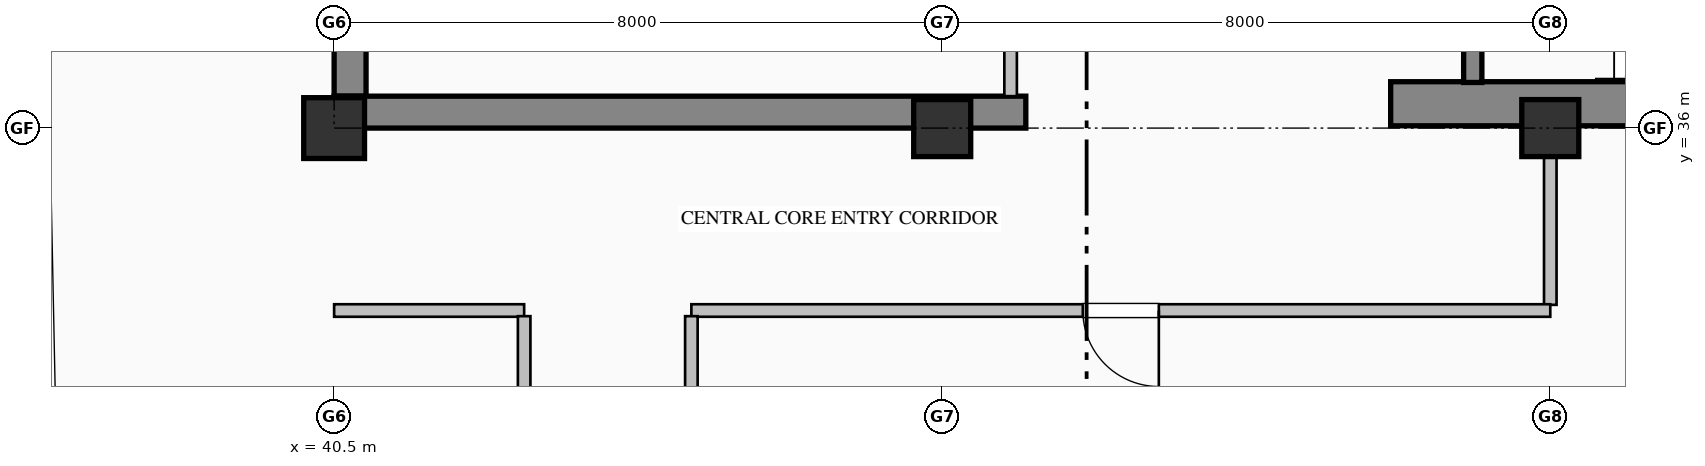
"""IFC4 building model, lengths in metres.
Left out: names, types, materials, properties, quantities, classifications, styles, units other than length and angle.
Written with IfcOpenShell. Run it as: python <this file> out.ifc"""

import sys

from ifc_helpers import new_model, si_unit, direction, frame, frame_2d, origin, origin_2d, place, context, subcontext, project, spatial, rectangle, hollow_rectangle, extrude, element, fill, save


model = new_model("IFC4")
c1 = context("Model", 3, precision=1e-05, world=origin(), true_north=direction((0.0, 1.0)))
c2 = subcontext(c1, "Body", "Model", "MODEL_VIEW")
j1 = project(units=[si_unit("LENGTHUNIT", "METRE"), si_unit("PLANEANGLEUNIT", "RADIAN")], contexts=[c1])
p1 = place(None, origin())
s1 = spatial("IfcSite", under=j1, at=p1, CompositionType="ELEMENT")
p2 = place(p1, origin())
s2 = spatial("IfcBuilding", under=s1, at=p2, CompositionType="ELEMENT")
p3 = place(p2, frame((0.0, 0.0, 291.2)))
s3 = spatial("IfcBuildingStorey", under=s2, at=p3, CompositionType="ELEMENT", Elevation=291.2)
p4 = place(p3, frame((40.71, 36.42, 0.0), z_axis=(0.0, 0.0, 1.0), x_axis=(0.0, 1.0, 0.0)))
e1 = element("IfcWall", 1, at=p4, inside=s3, PredefinedType="SHEAR", context=c2, shape_type="SweptSolid", body=[
    extrude(rectangle(XDim=7.98, YDim=0.42, at=frame_2d((3.99, 0.0))), origin(), (0.0, 0.0, 1.0), 3.785),
])
p5 = place(p3, frame((40.5, 36.21, 0.0), z_axis=(0.0, 0.0, 1.0), x_axis=(1.0, 0.0, 0.0)))
e2 = element("IfcWall", 2, at=p5, inside=s3, PredefinedType="SHEAR", context=c2, shape_type="SweptSolid", body=[
    extrude(rectangle(XDim=9.1, YDim=0.42, at=frame_2d((4.55, 0.0))), origin(), (0.0, 0.0, 1.0), 3.785),
])
p6 = place(p3, frame((54.4, 36.32, 0.0), z_axis=(0.0, 0.0, 1.0), x_axis=(1.0, 0.0, 0.0)))
e3 = element("IfcWall", 3, at=p6, inside=s3, PredefinedType="SHEAR", context=c2, shape_type="SweptSolid", body=[
    extrude(rectangle(XDim=9.6, YDim=0.58, at=frame_2d((4.8, 0.0))), origin(), (0.0, 0.0, 1.0), 4.0),
])
p7 = place(p3, frame((40.5, 36.0, 0.0), z_axis=(0.0, 0.0, 1.0), x_axis=(1.0, 0.0, 0.0)))
e4 = element("IfcColumn", 4, at=p7, inside=s3, PredefinedType="COLUMN", context=c2, shape_type="SweptSolid", body=[
    extrude(hollow_rectangle(XDim=0.8, YDim=0.8, WallThickness=0.032, at=origin_2d()), origin(), (0.0, 0.0, 1.0), 4.0),
])
for number, where, z_axis, x_axis in (
    (5, (48.5, 36.0, 0.0), (0.0, 0.0, 1.0), (1.0, 0.0, 0.0)),
    (6, (56.5, 36.0, 0.0), (0.0, 0.0, 1.0), (1.0, 0.0, 0.0)),
):
    element("IfcColumn", number, at=place(p3, frame(where, z_axis=z_axis, x_axis=x_axis)), inside=s3, PredefinedType="COLUMN", context=c2, shape_type="SweptSolid", body=[
        extrude(rectangle(XDim=0.75, YDim=0.75, at=origin_2d()), origin(), (0.0, 0.0, 1.0), 4.0),
    ])
p8 = place(p3, frame((55.48, 39.75, 0.0), z_axis=(0.0, 0.0, 1.0), x_axis=(0.0, -1.0, 0.0)))
e7 = element("IfcWall", 7, at=p8, inside=s3, PredefinedType="SOLIDWALL", context=c2, shape_type="SweptSolid", body=[
    extrude(rectangle(XDim=3.15, YDim=0.24, at=frame_2d((1.575, 0.0))), origin(), (0.0, 0.0, 1.0), 4.0),
])
p9 = place(p8, frame((1.0, 0.0, 0.0)))
e8 = element("IfcOpeningElement", 8, at=p9, cuts=e7, PredefinedType="OPENING", context=c2, shape_type="SweptSolid", body=[
    extrude(rectangle(XDim=1.15, YDim=2.2, at=frame_2d((0.575, 1.1))), frame((0.0, 0.13, 0.0), z_axis=(0.0, -1.0, 0.0), x_axis=(1.0, 0.0, 0.0)), (0.0, 0.0, 1.0), 0.26),
])
p10 = place(p3, frame((49.4, 36.42, 0.0), z_axis=(0.0, 0.0, 1.0), x_axis=(0.0, 1.0, 0.0)))
e9 = element("IfcWall", 9, at=p10, inside=s3, PredefinedType="PARTITIONING", context=c2, shape_type="SweptSolid", body=[
    extrude(rectangle(XDim=7.73, YDim=0.165, at=frame_2d((3.865, 0.0))), origin(), (0.0, 0.0, 1.0), 3.027),
])
p11 = place(p10, frame((3.365, 0.0, 0.0)))
e10 = element("IfcOpeningElement", 10, at=p11, cuts=e9, PredefinedType="OPENING", context=c2, shape_type="SweptSolid", body=[
    extrude(rectangle(XDim=1.0, YDim=2.15, at=frame_2d((0.5, 1.075))), frame((0.0, 0.093, 0.0), z_axis=(0.0, -1.0, 0.0), x_axis=(1.0, 0.0, 0.0)), (0.0, 0.0, 1.0), 0.185),
])
p12 = place(p3, frame((56.5, 36.0, 0.0), z_axis=(0.0, 0.0, 1.0), x_axis=(0.0, -1.0, 0.0)))
e11 = element("IfcWall", 11, at=p12, inside=s3, PredefinedType="PARTITIONING", context=c2, shape_type="SweptSolid", body=[
    extrude(rectangle(XDim=2.325, YDim=0.165, at=frame_2d((1.163, 0.0))), origin(), (0.0, 0.0, 1.0), 3.177),
])
p13 = place(p3, frame((56.5, 33.6, 0.0), z_axis=(0.0, 0.0, 1.0), x_axis=(-1.0, 0.0, 0.0)))
e12 = element("IfcWall", 12, at=p13, inside=s3, PredefinedType="PARTITIONING", context=c2, shape_type="SweptSolid", body=[
    extrude(rectangle(XDim=11.3, YDim=0.165, at=frame_2d((5.65, 0.0))), origin(), (0.0, 0.0, 1.0), 3.785),
])
p14 = place(p13, frame((5.15, 0.0, 0.0)))
e13 = element("IfcOpeningElement", 13, at=p14, cuts=e12, PredefinedType="OPENING", context=c2, shape_type="SweptSolid", body=[
    extrude(rectangle(XDim=1.0, YDim=2.15, at=frame_2d((0.5, 1.075))), frame((0.0, 0.093, 0.0), z_axis=(0.0, -1.0, 0.0), x_axis=(1.0, 0.0, 0.0)), (0.0, 0.0, 1.0), 0.185),
])
p15 = place(p3, frame((43.0, 33.6, 0.0), z_axis=(0.0, 0.0, 1.0), x_axis=(-1.0, 0.0, 0.0)))
e14 = element("IfcWall", 14, at=p15, inside=s3, PredefinedType="PARTITIONING", context=c2, shape_type="SweptSolid", body=[
    extrude(rectangle(XDim=2.5, YDim=0.165, at=frame_2d((1.25, 0.0))), origin(), (0.0, 0.0, 1.0), 3.785),
])
p16 = place(p3, frame((45.2, 33.525, 0.0), z_axis=(0.0, 0.0, 1.0), x_axis=(0.0, -1.0, 0.0)))
e15 = element("IfcWall", 15, at=p16, inside=s3, PredefinedType="PARTITIONING", context=c2, shape_type="SweptSolid", body=[
    extrude(rectangle(XDim=1.661, YDim=0.165, at=frame_2d((0.831, 0.0))), origin(), (0.0, 0.0, 1.0), 3.785),
])
p17 = place(p3, frame((43.0, 28.057, 0.0), z_axis=(0.0, 0.0, 1.0), x_axis=(0.0, 1.0, 0.0)))
e16 = element("IfcWall", 16, at=p17, inside=s3, PredefinedType="PARTITIONING", context=c2, shape_type="SweptSolid", body=[
    extrude(rectangle(XDim=5.469, YDim=0.165, at=frame_2d((2.734, 0.0))), origin(), (0.0, 0.0, 1.0), 3.785),
])
p18 = place(p17, frame((2.234, 0.0, 0.0)))
e17 = element("IfcOpeningElement", 17, at=p18, cuts=e16, PredefinedType="OPENING", context=c2, shape_type="SweptSolid", body=[
    extrude(rectangle(XDim=1.0, YDim=2.15, at=frame_2d((0.5, 1.075))), frame((0.0, 0.093, 0.0), z_axis=(0.0, -1.0, 0.0), x_axis=(1.0, 0.0, 0.0)), (0.0, 0.0, 1.0), 0.185),
])
p19 = place(p14, origin())
e18 = element("IfcDoor", 18, at=p19, inside=s3, OperationType="SINGLE_SWING_LEFT", PredefinedType="DOOR", context=c2, shape_type="SweptSolid", body=[
    extrude(rectangle(XDim=1.0, YDim=2.15, at=frame_2d((0.5, 1.075))), frame((0.0, 0.025, 0.0), z_axis=(0.0, -1.0, 0.0), x_axis=(1.0, 0.0, 0.0)), (0.0, 0.0, 1.0), 0.05),
])
fill(e13, e18)
save(model, sys.argv[1])
